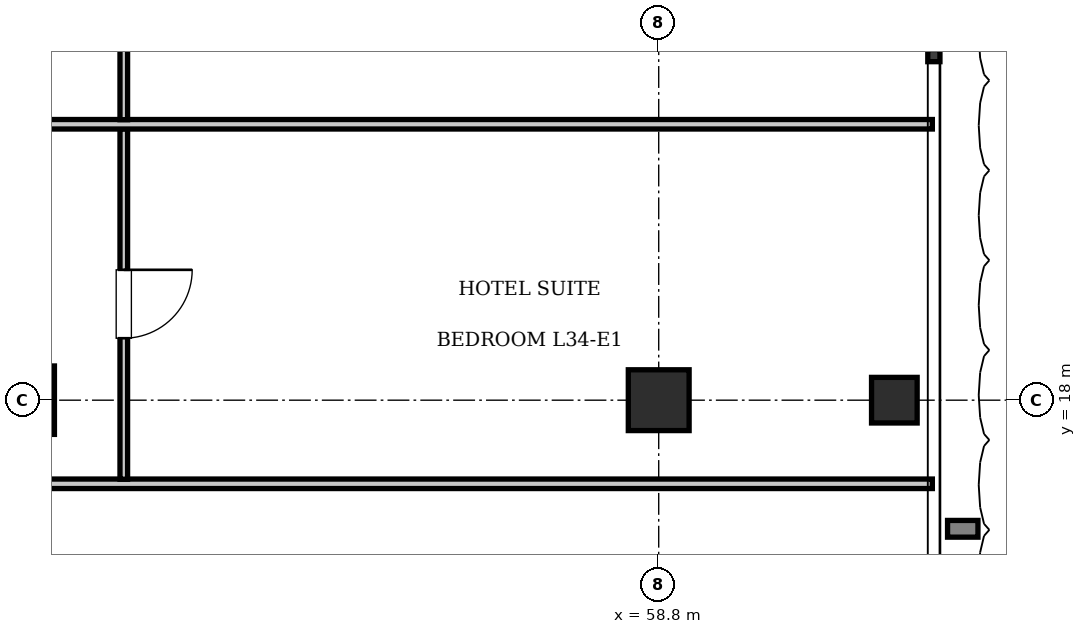
"""IFC4 building model, lengths in metres.
Left out: names, types, materials, properties, quantities, classifications, styles, units other than length and angle.
Written with IfcOpenShell. Run it as: python <this file> out.ifc"""

import sys

from ifc_helpers import new_model, si_unit, direction, frame, frame_2d, origin, origin_2d, place, context, subcontext, project, spatial, rectangle, i_section, extrude, element, fill, save


model = new_model("IFC4")
c1 = context("Model", 3, precision=1e-05, world=origin(), true_north=direction((0.0, 1.0)))
c2 = subcontext(c1, "Body", "Model", "MODEL_VIEW")
j1 = project(units=[si_unit("LENGTHUNIT", "METRE"), si_unit("PLANEANGLEUNIT", "RADIAN")], contexts=[c1])
p1 = place(None, origin())
s1 = spatial("IfcSite", under=j1, at=p1, CompositionType="ELEMENT")
p2 = place(p1, origin())
s2 = spatial("IfcBuilding", under=s1, at=p2, CompositionType="ELEMENT")
p3 = place(p2, frame((0.0, 0.0, 142.8)))
s3 = spatial("IfcBuildingStorey", under=s2, at=p3, CompositionType="ELEMENT", Elevation=142.8)
p4 = place(p3, frame((50.4, 18.0, 0.0), z_axis=(0.0, 0.0, 1.0), x_axis=(1.0, 0.0, 0.0)))
e1 = element("IfcColumn", 1, at=p4, inside=s3, PredefinedType="COLUMN", context=c2, shape_type="SweptSolid", body=[
    extrude(rectangle(XDim=0.9, YDim=0.9, at=origin_2d()), origin(), (0.0, 0.0, 1.0), 3.85),
])
p5 = place(p3, frame((58.8, 18.0, 0.0), z_axis=(0.0, 0.0, 1.0), x_axis=(1.0, 0.0, 0.0)))
e2 = element("IfcColumn", 2, at=p5, inside=s3, PredefinedType="COLUMN", context=c2, shape_type="SweptSolid", body=[
    extrude(rectangle(XDim=0.8, YDim=0.8, at=origin_2d()), origin(), (0.0, 0.0, 1.0), 3.85),
])
p6 = place(p3, frame((61.9, 18.0, 0.0), z_axis=(0.0, 0.0, 1.0), x_axis=(1.0, 0.0, 0.0)))
e3 = element("IfcColumn", 3, at=p6, inside=s3, PredefinedType="COLUMN", context=c2, shape_type="SweptSolid", body=[
    extrude(i_section(OverallWidth=0.6, OverallDepth=0.6, WebThickness=0.025, FlangeThickness=0.038, at=origin_2d()), origin(), (0.0, 0.0, 1.0), 3.85),
])
p7 = place(p3, frame((37.68, 16.9, 0.0), z_axis=(0.0, 0.0, 1.0), x_axis=(1.0, 0.0, 0.0)))
e4 = element("IfcWall", 4, at=p7, inside=s3, PredefinedType="PARTITIONING", context=c2, shape_type="SweptSolid", body=[
    extrude(rectangle(XDim=24.72, YDim=0.125, at=frame_2d((12.36, 0.0))), origin(), (0.0, 0.0, 1.0), 3.61),
])
p8 = place(p3, frame((51.762, 16.96, 0.0), z_axis=(0.0, 0.0, 1.0), x_axis=(0.0, 1.0, 0.0)))
e5 = element("IfcWall", 5, at=p8, inside=s3, PredefinedType="PARTITIONING", context=c2, shape_type="SweptSolid", body=[
    extrude(rectangle(XDim=4.61, YDim=0.1, at=frame_2d((2.305, 0.0))), origin(), (0.0, 0.0, 1.0), 3.61),
])
p9 = place(p8, frame((1.855, 0.0, 0.0)))
e6 = element("IfcOpeningElement", 6, at=p9, cuts=e5, PredefinedType="OPENING", context=c2, shape_type="SweptSolid", body=[
    extrude(rectangle(XDim=0.9, YDim=2.1, at=frame_2d((0.45, 1.05))), frame((0.0, 0.06, 0.0), z_axis=(0.0, -1.0, 0.0), x_axis=(1.0, 0.0, 0.0)), (0.0, 0.0, 1.0), 0.12),
])
p10 = place(p3, frame((37.68, 21.63, 0.0), z_axis=(0.0, 0.0, 1.0), x_axis=(1.0, 0.0, 0.0)))
e7 = element("IfcWall", 7, at=p10, inside=s3, PredefinedType="PARTITIONING", context=c2, shape_type="SweptSolid", body=[
    extrude(rectangle(XDim=24.72, YDim=0.125, at=frame_2d((12.36, 0.0))), origin(), (0.0, 0.0, 1.0), 3.61),
])
p11 = place(p3, frame((51.762, 21.69, 0.0), z_axis=(0.0, 0.0, 1.0), x_axis=(0.0, 1.0, 0.0)))
e8 = element("IfcWall", 8, at=p11, inside=s3, PredefinedType="PARTITIONING", context=c2, shape_type="SweptSolid", body=[
    extrude(rectangle(XDim=4.62, YDim=0.1, at=frame_2d((2.31, 0.0))), origin(), (0.0, 0.0, 1.0), 3.61),
])
p12 = place(p11, frame((1.86, 0.0, 0.0)))
e9 = element("IfcOpeningElement", 9, at=p12, cuts=e8, PredefinedType="OPENING", context=c2, shape_type="SweptSolid", body=[
    extrude(rectangle(XDim=0.9, YDim=2.1, at=frame_2d((0.45, 1.05))), frame((0.0, 0.06, 0.0), z_axis=(0.0, -1.0, 0.0), x_axis=(1.0, 0.0, 0.0)), (0.0, 0.0, 1.0), 0.12),
])
p13 = place(p9, frame((0.9, 0.0, 0.0), z_axis=(0.0, 0.0, 1.0), x_axis=(-1.0, 0.0, 0.0)))
e10 = element("IfcDoor", 10, at=p13, inside=s3, OperationType="SINGLE_SWING_LEFT", PredefinedType="DOOR", context=c2, shape_type="SweptSolid", body=[
    extrude(rectangle(XDim=0.9, YDim=2.1, at=frame_2d((0.45, 1.05))), frame((0.0, 0.025, 0.0), z_axis=(0.0, -1.0, 0.0), x_axis=(1.0, 0.0, 0.0)), (0.0, 0.0, 1.0), 0.05),
])
fill(e6, e10)
save(model, sys.argv[1])
